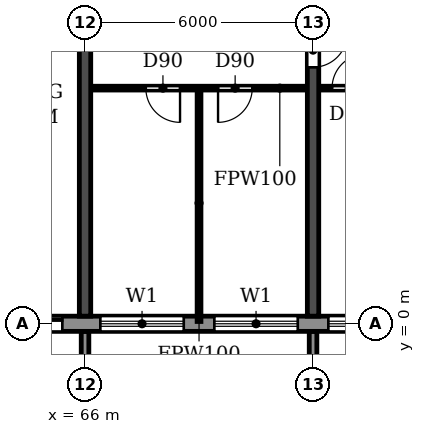
"""IFC4 building model, lengths in metres.
Left out: names, types, materials, properties, quantities, classifications, styles, units other than length and angle.
Written with IfcOpenShell. Run it as: python <this file> out.ifc"""

import sys

from ifc_helpers import new_model, si_unit, direction, frame, frame_2d, origin, place, context, subcontext, project, spatial, polyline, rectangle, outline, extrude, source, transform, mapped, element, fill, save


model = new_model("IFC4")
c1 = context("Model", 3, precision=1e-05, world=origin(), true_north=direction((0.0, 1.0)))
c2 = subcontext(c1, "Body", "Model", "MODEL_VIEW")
j1 = project(units=[si_unit("LENGTHUNIT", "METRE"), si_unit("PLANEANGLEUNIT", "RADIAN")], contexts=[c1])
p1 = place(None, origin())
s1 = spatial("IfcSite", under=j1, at=p1, CompositionType="ELEMENT")
p2 = place(p1, origin())
s2 = spatial("IfcBuilding", under=s1, at=p2, CompositionType="ELEMENT")
p3 = place(p2, frame((0.0, 0.0, 125.7)))
s3 = spatial("IfcBuildingStorey", under=s2, at=p3, CompositionType="ELEMENT", Elevation=125.7)
p4 = place(p3, frame((66.0, 0.2, 0.0), z_axis=(0.0, 0.0, 1.0), x_axis=(0.0, 1.0, 0.0)))
e1 = element("IfcWall", 1, at=p4, inside=s3, PredefinedType="SHEAR", context=c2, shape_type="SweptSolid", body=[
    extrude(rectangle(XDim=11.675, YDim=0.3, at=frame_2d((5.837, 0.0))), origin(), (0.0, 0.0, 1.0), 3.07),
])
p5 = place(p3, frame((72.0, 0.2, 0.0), z_axis=(0.0, 0.0, 1.0), x_axis=(0.0, 1.0, 0.0)))
e2 = element("IfcWall", 2, at=p5, inside=s3, PredefinedType="SHEAR", context=c2, shape_type="SweptSolid", body=[
    extrude(rectangle(XDim=11.675, YDim=0.3, at=frame_2d((5.837, 0.0))), origin(), (0.0, 0.0, 1.0), 3.07),
])
p6 = place(p5, frame((6.55, 0.0, 0.0)))
e3 = element("IfcOpeningElement", 3, at=p6, cuts=e2, PredefinedType="OPENING", context=c2, shape_type="SweptSolid", body=[
    extrude(rectangle(XDim=0.9, YDim=2.1, at=frame_2d((0.45, 1.05))), frame((0.0, 0.16, 0.0), z_axis=(0.0, -1.0, 0.0), x_axis=(1.0, 0.0, 0.0)), (0.0, 0.0, 1.0), 0.32),
])
p7 = place(p3, frame((16.683, 0.0, 0.0), z_axis=(0.0, 0.0, 1.0), x_axis=(1.0, 0.0, 0.0)))
e4 = element("IfcWall", 4, at=p7, inside=s3, PredefinedType="STANDARD", context=c2, shape_type="SweptSolid", body=[
    extrude(rectangle(XDim=68.634, YDim=0.4, at=frame_2d((34.317, 0.0))), origin(), (0.0, 0.0, 1.0), 3.07),
])
p8 = place(p7, frame((1.717, 0.0, 0.9)))
e5 = element("IfcOpeningElement", 5, at=p8, cuts=e4, PredefinedType="OPENING", context=c2, shape_type="SweptSolid", body=[
    extrude(rectangle(XDim=2.2, YDim=1.5, at=frame_2d((1.1, 0.75))), frame((0.0, 0.21, 0.0), z_axis=(0.0, -1.0, 0.0), x_axis=(1.0, 0.0, 0.0)), (0.0, 0.0, 1.0), 0.42),
])
p9 = place(p7, frame((4.717, 0.0, 0.9)))
e6 = element("IfcOpeningElement", 6, at=p9, cuts=e4, PredefinedType="OPENING", context=c2, shape_type="SweptSolid", body=[
    extrude(rectangle(XDim=2.2, YDim=1.5, at=frame_2d((1.1, 0.75))), frame((0.0, 0.21, 0.0), z_axis=(0.0, -1.0, 0.0), x_axis=(1.0, 0.0, 0.0)), (0.0, 0.0, 1.0), 0.42),
])
p10 = place(p7, frame((7.717, 0.0, 0.9)))
e7 = element("IfcOpeningElement", 7, at=p10, cuts=e4, PredefinedType="OPENING", context=c2, shape_type="SweptSolid", body=[
    extrude(rectangle(XDim=2.2, YDim=1.5, at=frame_2d((1.1, 0.75))), frame((0.0, 0.21, 0.0), z_axis=(0.0, -1.0, 0.0), x_axis=(1.0, 0.0, 0.0)), (0.0, 0.0, 1.0), 0.42),
])
p11 = place(p7, frame((10.717, 0.0, 0.9)))
e8 = element("IfcOpeningElement", 8, at=p11, cuts=e4, PredefinedType="OPENING", context=c2, shape_type="SweptSolid", body=[
    extrude(rectangle(XDim=2.2, YDim=1.5, at=frame_2d((1.1, 0.75))), frame((0.0, 0.21, 0.0), z_axis=(0.0, -1.0, 0.0), x_axis=(1.0, 0.0, 0.0)), (0.0, 0.0, 1.0), 0.42),
])
p12 = place(p7, frame((13.717, 0.0, 0.9)))
e9 = element("IfcOpeningElement", 9, at=p12, cuts=e4, PredefinedType="OPENING", context=c2, shape_type="SweptSolid", body=[
    extrude(rectangle(XDim=2.2, YDim=1.5, at=frame_2d((1.1, 0.75))), frame((0.0, 0.21, 0.0), z_axis=(0.0, -1.0, 0.0), x_axis=(1.0, 0.0, 0.0)), (0.0, 0.0, 1.0), 0.42),
])
p13 = place(p7, frame((16.717, 0.0, 0.9)))
e10 = element("IfcOpeningElement", 10, at=p13, cuts=e4, PredefinedType="OPENING", context=c2, shape_type="SweptSolid", body=[
    extrude(rectangle(XDim=2.2, YDim=1.5, at=frame_2d((1.1, 0.75))), frame((0.0, 0.21, 0.0), z_axis=(0.0, -1.0, 0.0), x_axis=(1.0, 0.0, 0.0)), (0.0, 0.0, 1.0), 0.42),
])
p14 = place(p7, frame((19.717, 0.0, 0.9)))
e11 = element("IfcOpeningElement", 11, at=p14, cuts=e4, PredefinedType="OPENING", context=c2, shape_type="SweptSolid", body=[
    extrude(rectangle(XDim=2.2, YDim=1.5, at=frame_2d((1.1, 0.75))), frame((0.0, 0.21, 0.0), z_axis=(0.0, -1.0, 0.0), x_axis=(1.0, 0.0, 0.0)), (0.0, 0.0, 1.0), 0.42),
])
p15 = place(p7, frame((22.917, 0.0, 0.0)))
e12 = element("IfcOpeningElement", 12, at=p15, cuts=e4, PredefinedType="OPENING", context=c2, shape_type="SweptSolid", body=[
    extrude(rectangle(XDim=1.8, YDim=2.4, at=frame_2d((0.9, 1.2))), frame((0.0, 0.21, 0.0), z_axis=(0.0, -1.0, 0.0), x_axis=(1.0, 0.0, 0.0)), (0.0, 0.0, 1.0), 0.42),
])
p16 = place(p7, frame((25.717, 0.0, 0.9)))
e13 = element("IfcOpeningElement", 13, at=p16, cuts=e4, PredefinedType="OPENING", context=c2, shape_type="SweptSolid", body=[
    extrude(rectangle(XDim=2.2, YDim=1.5, at=frame_2d((1.1, 0.75))), frame((0.0, 0.21, 0.0), z_axis=(0.0, -1.0, 0.0), x_axis=(1.0, 0.0, 0.0)), (0.0, 0.0, 1.0), 0.42),
])
p17 = place(p7, frame((28.717, 0.0, 0.9)))
e14 = element("IfcOpeningElement", 14, at=p17, cuts=e4, PredefinedType="OPENING", context=c2, shape_type="SweptSolid", body=[
    extrude(rectangle(XDim=2.2, YDim=1.5, at=frame_2d((1.1, 0.75))), frame((0.0, 0.21, 0.0), z_axis=(0.0, -1.0, 0.0), x_axis=(1.0, 0.0, 0.0)), (0.0, 0.0, 1.0), 0.42),
])
p18 = place(p7, frame((31.717, 0.0, 0.9)))
e15 = element("IfcOpeningElement", 15, at=p18, cuts=e4, PredefinedType="OPENING", context=c2, shape_type="SweptSolid", body=[
    extrude(rectangle(XDim=2.2, YDim=1.5, at=frame_2d((1.1, 0.75))), frame((0.0, 0.21, 0.0), z_axis=(0.0, -1.0, 0.0), x_axis=(1.0, 0.0, 0.0)), (0.0, 0.0, 1.0), 0.42),
])
p19 = place(p7, frame((34.917, 0.0, 0.0)))
e16 = element("IfcOpeningElement", 16, at=p19, cuts=e4, PredefinedType="OPENING", context=c2, shape_type="SweptSolid", body=[
    extrude(rectangle(XDim=1.8, YDim=2.4, at=frame_2d((0.9, 1.2))), frame((0.0, 0.21, 0.0), z_axis=(0.0, -1.0, 0.0), x_axis=(1.0, 0.0, 0.0)), (0.0, 0.0, 1.0), 0.42),
])
p20 = place(p7, frame((37.717, 0.0, 0.9)))
e17 = element("IfcOpeningElement", 17, at=p20, cuts=e4, PredefinedType="OPENING", context=c2, shape_type="SweptSolid", body=[
    extrude(rectangle(XDim=2.2, YDim=1.5, at=frame_2d((1.1, 0.75))), frame((0.0, 0.21, 0.0), z_axis=(0.0, -1.0, 0.0), x_axis=(1.0, 0.0, 0.0)), (0.0, 0.0, 1.0), 0.42),
])
p21 = place(p7, frame((40.717, 0.0, 0.9)))
e18 = element("IfcOpeningElement", 18, at=p21, cuts=e4, PredefinedType="OPENING", context=c2, shape_type="SweptSolid", body=[
    extrude(rectangle(XDim=2.2, YDim=1.5, at=frame_2d((1.1, 0.75))), frame((0.0, 0.21, 0.0), z_axis=(0.0, -1.0, 0.0), x_axis=(1.0, 0.0, 0.0)), (0.0, 0.0, 1.0), 0.42),
])
p22 = place(p7, frame((43.717, 0.0, 0.9)))
e19 = element("IfcOpeningElement", 19, at=p22, cuts=e4, PredefinedType="OPENING", context=c2, shape_type="SweptSolid", body=[
    extrude(rectangle(XDim=2.2, YDim=1.5, at=frame_2d((1.1, 0.75))), frame((0.0, 0.21, 0.0), z_axis=(0.0, -1.0, 0.0), x_axis=(1.0, 0.0, 0.0)), (0.0, 0.0, 1.0), 0.42),
])
p23 = place(p7, frame((46.917, 0.0, 0.0)))
e20 = element("IfcOpeningElement", 20, at=p23, cuts=e4, PredefinedType="OPENING", context=c2, shape_type="SweptSolid", body=[
    extrude(rectangle(XDim=1.8, YDim=2.4, at=frame_2d((0.9, 1.2))), frame((0.0, 0.21, 0.0), z_axis=(0.0, -1.0, 0.0), x_axis=(1.0, 0.0, 0.0)), (0.0, 0.0, 1.0), 0.42),
])
p24 = place(p7, frame((49.717, 0.0, 0.9)))
e21 = element("IfcOpeningElement", 21, at=p24, cuts=e4, PredefinedType="OPENING", context=c2, shape_type="SweptSolid", body=[
    extrude(rectangle(XDim=2.2, YDim=1.5, at=frame_2d((1.1, 0.75))), frame((0.0, 0.21, 0.0), z_axis=(0.0, -1.0, 0.0), x_axis=(1.0, 0.0, 0.0)), (0.0, 0.0, 1.0), 0.42),
])
p25 = place(p7, frame((52.717, 0.0, 0.9)))
e22 = element("IfcOpeningElement", 22, at=p25, cuts=e4, PredefinedType="OPENING", context=c2, shape_type="SweptSolid", body=[
    extrude(rectangle(XDim=2.2, YDim=1.5, at=frame_2d((1.1, 0.75))), frame((0.0, 0.21, 0.0), z_axis=(0.0, -1.0, 0.0), x_axis=(1.0, 0.0, 0.0)), (0.0, 0.0, 1.0), 0.42),
])
p26 = place(p7, frame((55.717, 0.0, 0.9)))
e23 = element("IfcOpeningElement", 23, at=p26, cuts=e4, PredefinedType="OPENING", context=c2, shape_type="SweptSolid", body=[
    extrude(rectangle(XDim=2.2, YDim=1.5, at=frame_2d((1.1, 0.75))), frame((0.0, 0.21, 0.0), z_axis=(0.0, -1.0, 0.0), x_axis=(1.0, 0.0, 0.0)), (0.0, 0.0, 1.0), 0.42),
])
p27 = place(p7, frame((58.917, 0.0, 0.0)))
e24 = element("IfcOpeningElement", 24, at=p27, cuts=e4, PredefinedType="OPENING", context=c2, shape_type="SweptSolid", body=[
    extrude(rectangle(XDim=1.8, YDim=2.4, at=frame_2d((0.9, 1.2))), frame((0.0, 0.21, 0.0), z_axis=(0.0, -1.0, 0.0), x_axis=(1.0, 0.0, 0.0)), (0.0, 0.0, 1.0), 0.42),
])
p28 = place(p7, frame((61.717, 0.0, 0.9)))
e25 = element("IfcOpeningElement", 25, at=p28, cuts=e4, PredefinedType="OPENING", context=c2, shape_type="SweptSolid", body=[
    extrude(rectangle(XDim=2.2, YDim=1.5, at=frame_2d((1.1, 0.75))), frame((0.0, 0.21, 0.0), z_axis=(0.0, -1.0, 0.0), x_axis=(1.0, 0.0, 0.0)), (0.0, 0.0, 1.0), 0.42),
])
p29 = place(p7, frame((64.717, 0.0, 0.9)))
e26 = element("IfcOpeningElement", 26, at=p29, cuts=e4, PredefinedType="OPENING", context=c2, shape_type="SweptSolid", body=[
    extrude(rectangle(XDim=2.2, YDim=1.5, at=frame_2d((1.1, 0.75))), frame((0.0, 0.21, 0.0), z_axis=(0.0, -1.0, 0.0), x_axis=(1.0, 0.0, 0.0)), (0.0, 0.0, 1.0), 0.42),
])
m1 = source(origin(), c2, "Body", "SweptSolid", [
    extrude(outline(polyline([(0.0, 0.0), (0.2, 0.0), (0.2, 1.65), (0.0, 1.65), (0.0, 0.0)])), origin(), (0.0, 0.0, 1.0), 3.1),
])
for number, where in (
    (27, (65.9, -1.85, 0.0)),
    (28, (71.9, -1.85, 0.0)),
):
    element("IfcWall", number, at=place(p3, frame(where)), inside=s3, PredefinedType="STANDARD", context=c2, shape_type="MappedRepresentation", body=[
        mapped(m1, transform((0.0, 0.0, 0.0))),
    ])
p30 = place(p3, frame((66.16, 6.2, 0.0), z_axis=(0.0, 0.0, 1.0), x_axis=(1.0, 0.0, 0.0)))
e29 = element("IfcWall", 29, at=p30, inside=s3, PredefinedType="PARTITIONING", context=c2, shape_type="SweptSolid", body=[
    extrude(rectangle(XDim=5.68, YDim=0.1, at=frame_2d((2.84, 0.0))), origin(), (0.0, 0.0, 1.0), 3.07),
])
p31 = place(p30, frame((1.44, 0.0, 0.0)))
e30 = element("IfcOpeningElement", 30, at=p31, cuts=e29, PredefinedType="OPENING", context=c2, shape_type="SweptSolid", body=[
    extrude(rectangle(XDim=0.9, YDim=2.1, at=frame_2d((0.45, 1.05))), frame((0.0, 0.06, 0.0), z_axis=(0.0, -1.0, 0.0), x_axis=(1.0, 0.0, 0.0)), (0.0, 0.0, 1.0), 0.12),
])
p32 = place(p30, frame((3.34, 0.0, 0.0)))
e31 = element("IfcOpeningElement", 31, at=p32, cuts=e29, PredefinedType="OPENING", context=c2, shape_type="SweptSolid", body=[
    extrude(rectangle(XDim=0.9, YDim=2.1, at=frame_2d((0.45, 1.05))), frame((0.0, 0.06, 0.0), z_axis=(0.0, -1.0, 0.0), x_axis=(1.0, 0.0, 0.0)), (0.0, 0.0, 1.0), 0.12),
])
p33 = place(p3, frame((72.16, 6.2, 0.0), z_axis=(0.0, 0.0, 1.0), x_axis=(1.0, 0.0, 0.0)))
e32 = element("IfcWall", 32, at=p33, inside=s3, PredefinedType="PARTITIONING", context=c2, shape_type="SweptSolid", body=[
    extrude(rectangle(XDim=2.89, YDim=0.1, at=frame_2d((1.445, 0.0))), origin(), (0.0, 0.0, 1.0), 3.07),
])
p34 = place(p33, frame((0.34, 0.0, 0.0)))
e33 = element("IfcOpeningElement", 33, at=p34, cuts=e32, PredefinedType="OPENING", context=c2, shape_type="SweptSolid", body=[
    extrude(rectangle(XDim=0.9, YDim=2.1, at=frame_2d((0.45, 1.05))), frame((0.0, 0.06, 0.0), z_axis=(0.0, -1.0, 0.0), x_axis=(1.0, 0.0, 0.0)), (0.0, 0.0, 1.0), 0.12),
])
p35 = place(p3, frame((69.0, 0.06, 0.0), z_axis=(0.0, 0.0, 1.0), x_axis=(0.0, 1.0, 0.0)))
e34 = element("IfcWall", 34, at=p35, inside=s3, PredefinedType="PARTITIONING", context=c2, shape_type="SweptSolid", body=[
    extrude(rectangle(XDim=6.09, YDim=0.1, at=frame_2d((3.045, 0.0))), origin(), (0.0, 0.0, 1.0), 3.07),
])
p36 = place(p23, origin())
e35 = element("IfcDoor", 35, at=p36, inside=s3, OperationType="DOUBLE_DOOR_SLIDING", PredefinedType="DOOR", context=c2, shape_type="SweptSolid", body=[
    extrude(rectangle(XDim=1.8, YDim=2.4, at=frame_2d((0.9, 1.2))), frame((0.0, 0.025, 0.0), z_axis=(0.0, -1.0, 0.0), x_axis=(1.0, 0.0, 0.0)), (0.0, 0.0, 1.0), 0.05),
])
fill(e20, e35)
p37 = place(p24, origin())
e36 = element("IfcWindow", 36, at=p37, inside=s3, PartitioningType="DOUBLE_PANEL_HORIZONTAL", PredefinedType="WINDOW", context=c2, shape_type="SweptSolid", body=[
    extrude(rectangle(XDim=2.2, YDim=1.5, at=frame_2d((1.1, 0.75))), frame((0.0, 0.03, 0.0), z_axis=(0.0, -1.0, 0.0), x_axis=(1.0, 0.0, 0.0)), (0.0, 0.0, 1.0), 0.06),
])
fill(e21, e36)
p38 = place(p25, origin())
e37 = element("IfcWindow", 37, at=p38, inside=s3, PartitioningType="DOUBLE_PANEL_HORIZONTAL", PredefinedType="WINDOW", context=c2, shape_type="SweptSolid", body=[
    extrude(rectangle(XDim=2.2, YDim=1.5, at=frame_2d((1.1, 0.75))), frame((0.0, 0.03, 0.0), z_axis=(0.0, -1.0, 0.0), x_axis=(1.0, 0.0, 0.0)), (0.0, 0.0, 1.0), 0.06),
])
fill(e22, e37)
p39 = place(p26, origin())
e38 = element("IfcWindow", 38, at=p39, inside=s3, PartitioningType="DOUBLE_PANEL_HORIZONTAL", PredefinedType="WINDOW", context=c2, shape_type="SweptSolid", body=[
    extrude(rectangle(XDim=2.2, YDim=1.5, at=frame_2d((1.1, 0.75))), frame((0.0, 0.03, 0.0), z_axis=(0.0, -1.0, 0.0), x_axis=(1.0, 0.0, 0.0)), (0.0, 0.0, 1.0), 0.06),
])
fill(e23, e38)
p40 = place(p31, frame((0.9, 0.0, 0.0), z_axis=(0.0, 0.0, 1.0), x_axis=(-1.0, 0.0, 0.0)))
e39 = element("IfcDoor", 39, at=p40, inside=s3, OperationType="SINGLE_SWING_LEFT", PredefinedType="DOOR", context=c2, shape_type="SweptSolid", body=[
    extrude(rectangle(XDim=0.9, YDim=2.1, at=frame_2d((0.45, 1.05))), frame((0.0, 0.025, 0.0), z_axis=(0.0, -1.0, 0.0), x_axis=(1.0, 0.0, 0.0)), (0.0, 0.0, 1.0), 0.05),
])
fill(e30, e39)
p41 = place(p32, frame((0.9, 0.0, 0.0), z_axis=(0.0, 0.0, 1.0), x_axis=(-1.0, 0.0, 0.0)))
e40 = element("IfcDoor", 40, at=p41, inside=s3, OperationType="SINGLE_SWING_RIGHT", PredefinedType="DOOR", context=c2, shape_type="SweptSolid", body=[
    extrude(rectangle(XDim=0.9, YDim=2.1, at=frame_2d((0.45, 1.05))), frame((0.0, 0.025, 0.0), z_axis=(0.0, -1.0, 0.0), x_axis=(1.0, 0.0, 0.0)), (0.0, 0.0, 1.0), 0.05),
])
fill(e31, e40)
p42 = place(p6, frame((0.9, 0.0, 0.0), z_axis=(0.0, 0.0, 1.0), x_axis=(-1.0, 0.0, 0.0)))
e41 = element("IfcDoor", 41, at=p42, inside=s3, OperationType="SINGLE_SWING_LEFT", PredefinedType="DOOR", context=c2, shape_type="SweptSolid", body=[
    extrude(rectangle(XDim=0.9, YDim=2.1, at=frame_2d((0.45, 1.05))), frame((0.0, 0.025, 0.0), z_axis=(0.0, -1.0, 0.0), x_axis=(1.0, 0.0, 0.0)), (0.0, 0.0, 1.0), 0.05),
])
fill(e3, e41)
p43 = place(p34, origin())
e42 = element("IfcDoor", 42, at=p43, inside=s3, OperationType="SINGLE_SWING_RIGHT", PredefinedType="DOOR", context=c2, shape_type="SweptSolid", body=[
    extrude(rectangle(XDim=0.9, YDim=2.1, at=frame_2d((0.45, 1.05))), frame((0.0, 0.025, 0.0), z_axis=(0.0, -1.0, 0.0), x_axis=(1.0, 0.0, 0.0)), (0.0, 0.0, 1.0), 0.05),
])
fill(e33, e42)
save(model, sys.argv[1])
